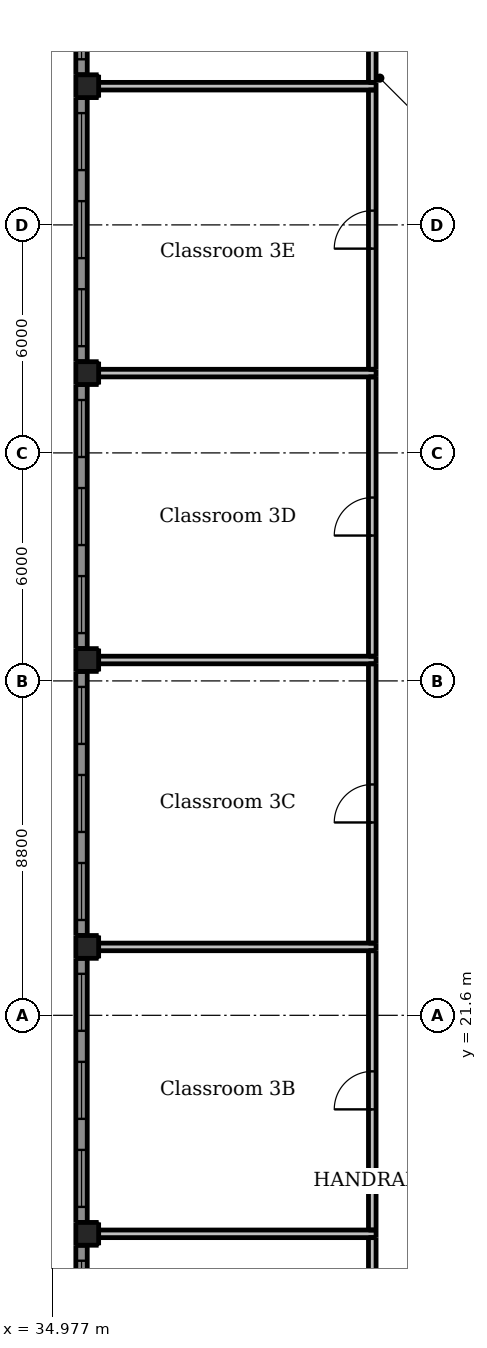
"""IFC4 building model, lengths in metres.
Left out: names, types, materials, properties, quantities, classifications, styles, units other than length and angle.
Written with IfcOpenShell. Run it as: python <this file> out.ifc"""

import sys

from ifc_helpers import new_model, si_unit, direction, frame, frame_2d, origin, origin_2d, place, context, subcontext, project, spatial, rectangle, extrude, element, fill, save


model = new_model("IFC4")
c1 = context("Model", 3, precision=1e-05, world=origin(), true_north=direction((0.0, 1.0)))
c2 = subcontext(c1, "Body", "Model", "MODEL_VIEW")
j1 = project(units=[si_unit("LENGTHUNIT", "METRE"), si_unit("PLANEANGLEUNIT", "RADIAN")], contexts=[c1])
p1 = place(None, origin())
s1 = spatial("IfcSite", under=j1, at=p1, CompositionType="ELEMENT")
p2 = place(p1, origin())
s2 = spatial("IfcBuilding", under=s1, at=p2, CompositionType="ELEMENT")
p3 = place(p2, frame((0.0, 0.0, 14.5)))
s3 = spatial("IfcBuildingStorey", under=s2, at=p3, CompositionType="ELEMENT", Elevation=14.5)
for number, where, z_axis, x_axis in (
    (1, (35.9, 15.85, -0.3), (0.0, 0.0, 1.0), (1.0, 0.0, 0.0)),
    (2, (35.9, 23.4, -0.3), (0.0, 0.0, 1.0), (1.0, 0.0, 0.0)),
    (3, (35.9, 30.95, -0.3), (0.0, 0.0, 1.0), (1.0, 0.0, 0.0)),
    (4, (35.9, 38.5, -0.3), (0.0, 0.0, 1.0), (1.0, 0.0, 0.0)),
    (5, (35.9, 46.05, -0.3), (0.0, 0.0, 1.0), (1.0, 0.0, 0.0)),
):
    element("IfcColumn", number, at=place(p3, frame(where, z_axis=z_axis, x_axis=x_axis)), inside=s3, PredefinedType="COLUMN", context=c2, shape_type="SweptSolid", body=[
        extrude(rectangle(XDim=0.6, YDim=0.6, at=origin_2d()), origin(), (0.0, 0.0, 1.0), 4.5),
    ])
p4 = place(p3, frame((35.75, 8.6, 0.0), z_axis=(0.0, 0.0, 1.0), x_axis=(0.0, 1.0, 0.0)))
e6 = element("IfcWall", 6, at=p4, inside=s3, PredefinedType="SOLIDWALL", context=c2, shape_type="SweptSolid", body=[
    extrude(rectangle(XDim=6.95, YDim=0.3, at=frame_2d((3.475, 0.0))), origin(), (0.0, 0.0, 1.0), 3.3),
])
p5 = place(p4, frame((0.408, 0.0, 0.9)))
e7 = element("IfcOpeningElement", 7, at=p5, cuts=e6, PredefinedType="OPENING", context=c2, shape_type="SweptSolid", body=[
    extrude(rectangle(XDim=1.5, YDim=1.5, at=frame_2d((0.75, 0.75))), frame((0.0, 0.16, 0.0), z_axis=(0.0, -1.0, 0.0), x_axis=(1.0, 0.0, 0.0)), (0.0, 0.0, 1.0), 0.32),
])
p6 = place(p4, frame((2.725, 0.0, 0.9)))
e8 = element("IfcOpeningElement", 8, at=p6, cuts=e6, PredefinedType="OPENING", context=c2, shape_type="SweptSolid", body=[
    extrude(rectangle(XDim=1.5, YDim=1.5, at=frame_2d((0.75, 0.75))), frame((0.0, 0.16, 0.0), z_axis=(0.0, -1.0, 0.0), x_axis=(1.0, 0.0, 0.0)), (0.0, 0.0, 1.0), 0.32),
])
p7 = place(p4, frame((5.042, 0.0, 0.9)))
e9 = element("IfcOpeningElement", 9, at=p7, cuts=e6, PredefinedType="OPENING", context=c2, shape_type="SweptSolid", body=[
    extrude(rectangle(XDim=1.5, YDim=1.5, at=frame_2d((0.75, 0.75))), frame((0.0, 0.16, 0.0), z_axis=(0.0, -1.0, 0.0), x_axis=(1.0, 0.0, 0.0)), (0.0, 0.0, 1.0), 0.32),
])
p8 = place(p3, frame((35.75, 16.15, 0.0), z_axis=(0.0, 0.0, 1.0), x_axis=(0.0, 1.0, 0.0)))
e10 = element("IfcWall", 10, at=p8, inside=s3, PredefinedType="SOLIDWALL", context=c2, shape_type="SweptSolid", body=[
    extrude(rectangle(XDim=6.95, YDim=0.3, at=frame_2d((3.475, 0.0))), origin(), (0.0, 0.0, 1.0), 3.3),
])
p9 = place(p8, frame((0.408, 0.0, 0.9)))
e11 = element("IfcOpeningElement", 11, at=p9, cuts=e10, PredefinedType="OPENING", context=c2, shape_type="SweptSolid", body=[
    extrude(rectangle(XDim=1.5, YDim=1.5, at=frame_2d((0.75, 0.75))), frame((0.0, 0.16, 0.0), z_axis=(0.0, -1.0, 0.0), x_axis=(1.0, 0.0, 0.0)), (0.0, 0.0, 1.0), 0.32),
])
p10 = place(p8, frame((2.725, 0.0, 0.9)))
e12 = element("IfcOpeningElement", 12, at=p10, cuts=e10, PredefinedType="OPENING", context=c2, shape_type="SweptSolid", body=[
    extrude(rectangle(XDim=1.5, YDim=1.5, at=frame_2d((0.75, 0.75))), frame((0.0, 0.16, 0.0), z_axis=(0.0, -1.0, 0.0), x_axis=(1.0, 0.0, 0.0)), (0.0, 0.0, 1.0), 0.32),
])
p11 = place(p8, frame((5.042, 0.0, 0.9)))
e13 = element("IfcOpeningElement", 13, at=p11, cuts=e10, PredefinedType="OPENING", context=c2, shape_type="SweptSolid", body=[
    extrude(rectangle(XDim=1.5, YDim=1.5, at=frame_2d((0.75, 0.75))), frame((0.0, 0.16, 0.0), z_axis=(0.0, -1.0, 0.0), x_axis=(1.0, 0.0, 0.0)), (0.0, 0.0, 1.0), 0.32),
])
p12 = place(p3, frame((35.75, 23.7, 0.0), z_axis=(0.0, 0.0, 1.0), x_axis=(0.0, 1.0, 0.0)))
e14 = element("IfcWall", 14, at=p12, inside=s3, PredefinedType="SOLIDWALL", context=c2, shape_type="SweptSolid", body=[
    extrude(rectangle(XDim=6.95, YDim=0.3, at=frame_2d((3.475, 0.0))), origin(), (0.0, 0.0, 1.0), 3.3),
])
p13 = place(p12, frame((0.408, 0.0, 0.9)))
e15 = element("IfcOpeningElement", 15, at=p13, cuts=e14, PredefinedType="OPENING", context=c2, shape_type="SweptSolid", body=[
    extrude(rectangle(XDim=1.5, YDim=1.5, at=frame_2d((0.75, 0.75))), frame((0.0, 0.16, 0.0), z_axis=(0.0, -1.0, 0.0), x_axis=(1.0, 0.0, 0.0)), (0.0, 0.0, 1.0), 0.32),
])
p14 = place(p12, frame((2.725, 0.0, 0.9)))
e16 = element("IfcOpeningElement", 16, at=p14, cuts=e14, PredefinedType="OPENING", context=c2, shape_type="SweptSolid", body=[
    extrude(rectangle(XDim=1.5, YDim=1.5, at=frame_2d((0.75, 0.75))), frame((0.0, 0.16, 0.0), z_axis=(0.0, -1.0, 0.0), x_axis=(1.0, 0.0, 0.0)), (0.0, 0.0, 1.0), 0.32),
])
p15 = place(p12, frame((5.042, 0.0, 0.9)))
e17 = element("IfcOpeningElement", 17, at=p15, cuts=e14, PredefinedType="OPENING", context=c2, shape_type="SweptSolid", body=[
    extrude(rectangle(XDim=1.5, YDim=1.5, at=frame_2d((0.75, 0.75))), frame((0.0, 0.16, 0.0), z_axis=(0.0, -1.0, 0.0), x_axis=(1.0, 0.0, 0.0)), (0.0, 0.0, 1.0), 0.32),
])
p16 = place(p3, frame((35.75, 31.25, 0.0), z_axis=(0.0, 0.0, 1.0), x_axis=(0.0, 1.0, 0.0)))
e18 = element("IfcWall", 18, at=p16, inside=s3, PredefinedType="SOLIDWALL", context=c2, shape_type="SweptSolid", body=[
    extrude(rectangle(XDim=6.95, YDim=0.3, at=frame_2d((3.475, 0.0))), origin(), (0.0, 0.0, 1.0), 3.3),
])
p17 = place(p16, frame((0.408, 0.0, 0.9)))
e19 = element("IfcOpeningElement", 19, at=p17, cuts=e18, PredefinedType="OPENING", context=c2, shape_type="SweptSolid", body=[
    extrude(rectangle(XDim=1.5, YDim=1.5, at=frame_2d((0.75, 0.75))), frame((0.0, 0.16, 0.0), z_axis=(0.0, -1.0, 0.0), x_axis=(1.0, 0.0, 0.0)), (0.0, 0.0, 1.0), 0.32),
])
p18 = place(p16, frame((2.725, 0.0, 0.9)))
e20 = element("IfcOpeningElement", 20, at=p18, cuts=e18, PredefinedType="OPENING", context=c2, shape_type="SweptSolid", body=[
    extrude(rectangle(XDim=1.5, YDim=1.5, at=frame_2d((0.75, 0.75))), frame((0.0, 0.16, 0.0), z_axis=(0.0, -1.0, 0.0), x_axis=(1.0, 0.0, 0.0)), (0.0, 0.0, 1.0), 0.32),
])
p19 = place(p16, frame((5.042, 0.0, 0.9)))
e21 = element("IfcOpeningElement", 21, at=p19, cuts=e18, PredefinedType="OPENING", context=c2, shape_type="SweptSolid", body=[
    extrude(rectangle(XDim=1.5, YDim=1.5, at=frame_2d((0.75, 0.75))), frame((0.0, 0.16, 0.0), z_axis=(0.0, -1.0, 0.0), x_axis=(1.0, 0.0, 0.0)), (0.0, 0.0, 1.0), 0.32),
])
p20 = place(p3, frame((35.75, 38.8, 0.0), z_axis=(0.0, 0.0, 1.0), x_axis=(0.0, 1.0, 0.0)))
e22 = element("IfcWall", 22, at=p20, inside=s3, PredefinedType="SOLIDWALL", context=c2, shape_type="SweptSolid", body=[
    extrude(rectangle(XDim=6.95, YDim=0.3, at=frame_2d((3.475, 0.0))), origin(), (0.0, 0.0, 1.0), 3.3),
])
p21 = place(p20, frame((0.408, 0.0, 0.9)))
e23 = element("IfcOpeningElement", 23, at=p21, cuts=e22, PredefinedType="OPENING", context=c2, shape_type="SweptSolid", body=[
    extrude(rectangle(XDim=1.5, YDim=1.5, at=frame_2d((0.75, 0.75))), frame((0.0, 0.16, 0.0), z_axis=(0.0, -1.0, 0.0), x_axis=(1.0, 0.0, 0.0)), (0.0, 0.0, 1.0), 0.32),
])
p22 = place(p20, frame((2.725, 0.0, 0.9)))
e24 = element("IfcOpeningElement", 24, at=p22, cuts=e22, PredefinedType="OPENING", context=c2, shape_type="SweptSolid", body=[
    extrude(rectangle(XDim=1.5, YDim=1.5, at=frame_2d((0.75, 0.75))), frame((0.0, 0.16, 0.0), z_axis=(0.0, -1.0, 0.0), x_axis=(1.0, 0.0, 0.0)), (0.0, 0.0, 1.0), 0.32),
])
p23 = place(p20, frame((5.042, 0.0, 0.9)))
e25 = element("IfcOpeningElement", 25, at=p23, cuts=e22, PredefinedType="OPENING", context=c2, shape_type="SweptSolid", body=[
    extrude(rectangle(XDim=1.5, YDim=1.5, at=frame_2d((0.75, 0.75))), frame((0.0, 0.16, 0.0), z_axis=(0.0, -1.0, 0.0), x_axis=(1.0, 0.0, 0.0)), (0.0, 0.0, 1.0), 0.32),
])
p24 = place(p3, frame((35.75, 46.35, 0.0), z_axis=(0.0, 0.0, 1.0), x_axis=(0.0, 1.0, 0.0)))
e26 = element("IfcWall", 26, at=p24, inside=s3, PredefinedType="SOLIDWALL", context=c2, shape_type="SweptSolid", body=[
    extrude(rectangle(XDim=6.95, YDim=0.3, at=frame_2d((3.475, 0.0))), origin(), (0.0, 0.0, 1.0), 3.3),
])
p25 = place(p24, frame((0.408, 0.0, 0.9)))
e27 = element("IfcOpeningElement", 27, at=p25, cuts=e26, PredefinedType="OPENING", context=c2, shape_type="SweptSolid", body=[
    extrude(rectangle(XDim=1.5, YDim=1.5, at=frame_2d((0.75, 0.75))), frame((0.0, 0.16, 0.0), z_axis=(0.0, -1.0, 0.0), x_axis=(1.0, 0.0, 0.0)), (0.0, 0.0, 1.0), 0.32),
])
p26 = place(p24, frame((2.725, 0.0, 0.9)))
e28 = element("IfcOpeningElement", 28, at=p26, cuts=e26, PredefinedType="OPENING", context=c2, shape_type="SweptSolid", body=[
    extrude(rectangle(XDim=1.5, YDim=1.5, at=frame_2d((0.75, 0.75))), frame((0.0, 0.16, 0.0), z_axis=(0.0, -1.0, 0.0), x_axis=(1.0, 0.0, 0.0)), (0.0, 0.0, 1.0), 0.32),
])
p27 = place(p24, frame((5.042, 0.0, 0.9)))
e29 = element("IfcOpeningElement", 29, at=p27, cuts=e26, PredefinedType="OPENING", context=c2, shape_type="SweptSolid", body=[
    extrude(rectangle(XDim=1.5, YDim=1.5, at=frame_2d((0.75, 0.75))), frame((0.0, 0.16, 0.0), z_axis=(0.0, -1.0, 0.0), x_axis=(1.0, 0.0, 0.0)), (0.0, 0.0, 1.0), 0.32),
])
p28 = place(p3, frame((43.4, 8.3, 0.0), z_axis=(0.0, 0.0, 1.0), x_axis=(0.0, 1.0, 0.0)))
e30 = element("IfcWall", 30, at=p28, inside=s3, PredefinedType="PARTITIONING", context=c2, shape_type="SweptSolid", body=[
    extrude(rectangle(XDim=7.45, YDim=0.2, at=frame_2d((3.725, 0.0))), origin(), (0.0, 0.0, 1.0), 3.1),
])
p29 = place(p28, frame((3.225, 0.0, 0.0)))
e31 = element("IfcOpeningElement", 31, at=p29, cuts=e30, PredefinedType="OPENING", context=c2, shape_type="SweptSolid", body=[
    extrude(rectangle(XDim=1.0, YDim=2.1, at=frame_2d((0.5, 1.05))), frame((0.0, 0.11, 0.0), z_axis=(0.0, -1.0, 0.0), x_axis=(1.0, 0.0, 0.0)), (0.0, 0.0, 1.0), 0.22),
])
p30 = place(p3, frame((43.4, 15.95, 0.0), z_axis=(0.0, 0.0, 1.0), x_axis=(0.0, 1.0, 0.0)))
e32 = element("IfcWall", 32, at=p30, inside=s3, PredefinedType="PARTITIONING", context=c2, shape_type="SweptSolid", body=[
    extrude(rectangle(XDim=7.35, YDim=0.2, at=frame_2d((3.675, 0.0))), origin(), (0.0, 0.0, 1.0), 3.1),
])
p31 = place(p30, frame((3.175, 0.0, 0.0)))
e33 = element("IfcOpeningElement", 33, at=p31, cuts=e32, PredefinedType="OPENING", context=c2, shape_type="SweptSolid", body=[
    extrude(rectangle(XDim=1.0, YDim=2.1, at=frame_2d((0.5, 1.05))), frame((0.0, 0.11, 0.0), z_axis=(0.0, -1.0, 0.0), x_axis=(1.0, 0.0, 0.0)), (0.0, 0.0, 1.0), 0.22),
])
p32 = place(p3, frame((43.4, 23.5, 0.0), z_axis=(0.0, 0.0, 1.0), x_axis=(0.0, 1.0, 0.0)))
e34 = element("IfcWall", 34, at=p32, inside=s3, PredefinedType="PARTITIONING", context=c2, shape_type="SweptSolid", body=[
    extrude(rectangle(XDim=7.35, YDim=0.2, at=frame_2d((3.675, 0.0))), origin(), (0.0, 0.0, 1.0), 3.1),
])
p33 = place(p32, frame((3.175, 0.0, 0.0)))
e35 = element("IfcOpeningElement", 35, at=p33, cuts=e34, PredefinedType="OPENING", context=c2, shape_type="SweptSolid", body=[
    extrude(rectangle(XDim=1.0, YDim=2.1, at=frame_2d((0.5, 1.05))), frame((0.0, 0.11, 0.0), z_axis=(0.0, -1.0, 0.0), x_axis=(1.0, 0.0, 0.0)), (0.0, 0.0, 1.0), 0.22),
])
p34 = place(p3, frame((43.4, 31.05, 0.0), z_axis=(0.0, 0.0, 1.0), x_axis=(0.0, 1.0, 0.0)))
e36 = element("IfcWall", 36, at=p34, inside=s3, PredefinedType="PARTITIONING", context=c2, shape_type="SweptSolid", body=[
    extrude(rectangle(XDim=7.35, YDim=0.2, at=frame_2d((3.675, 0.0))), origin(), (0.0, 0.0, 1.0), 3.1),
])
p35 = place(p34, frame((3.175, 0.0, 0.0)))
e37 = element("IfcOpeningElement", 37, at=p35, cuts=e36, PredefinedType="OPENING", context=c2, shape_type="SweptSolid", body=[
    extrude(rectangle(XDim=1.0, YDim=2.1, at=frame_2d((0.5, 1.05))), frame((0.0, 0.11, 0.0), z_axis=(0.0, -1.0, 0.0), x_axis=(1.0, 0.0, 0.0)), (0.0, 0.0, 1.0), 0.22),
])
p36 = place(p3, frame((43.4, 38.6, 0.0), z_axis=(0.0, 0.0, 1.0), x_axis=(0.0, 1.0, 0.0)))
e38 = element("IfcWall", 38, at=p36, inside=s3, PredefinedType="PARTITIONING", context=c2, shape_type="SweptSolid", body=[
    extrude(rectangle(XDim=7.35, YDim=0.2, at=frame_2d((3.675, 0.0))), origin(), (0.0, 0.0, 1.0), 3.1),
])
p37 = place(p36, frame((3.175, 0.0, 0.0)))
e39 = element("IfcOpeningElement", 39, at=p37, cuts=e38, PredefinedType="OPENING", context=c2, shape_type="SweptSolid", body=[
    extrude(rectangle(XDim=1.0, YDim=2.1, at=frame_2d((0.5, 1.05))), frame((0.0, 0.11, 0.0), z_axis=(0.0, -1.0, 0.0), x_axis=(1.0, 0.0, 0.0)), (0.0, 0.0, 1.0), 0.22),
])
p38 = place(p3, frame((43.4, 46.15, 0.0), z_axis=(0.0, 0.0, 1.0), x_axis=(0.0, 1.0, 0.0)))
e40 = element("IfcWall", 40, at=p38, inside=s3, PredefinedType="PARTITIONING", context=c2, shape_type="SweptSolid", body=[
    extrude(rectangle(XDim=7.35, YDim=0.2, at=frame_2d((3.675, 0.0))), origin(), (0.0, 0.0, 1.0), 3.1),
])
p39 = place(p38, frame((3.175, 0.0, 0.0)))
e41 = element("IfcOpeningElement", 41, at=p39, cuts=e40, PredefinedType="OPENING", context=c2, shape_type="SweptSolid", body=[
    extrude(rectangle(XDim=1.0, YDim=2.1, at=frame_2d((0.5, 1.05))), frame((0.0, 0.11, 0.0), z_axis=(0.0, -1.0, 0.0), x_axis=(1.0, 0.0, 0.0)), (0.0, 0.0, 1.0), 0.22),
])
for number, where, z_axis, x_axis in (
    (42, (36.2, 15.85, 0.0), (0.0, 0.0, 1.0), (1.0, 0.0, 0.0)),
    (43, (36.2, 23.4, 0.0), (0.0, 0.0, 1.0), (1.0, 0.0, 0.0)),
    (44, (36.2, 30.95, 0.0), (0.0, 0.0, 1.0), (1.0, 0.0, 0.0)),
    (45, (36.2, 38.5, 0.0), (0.0, 0.0, 1.0), (1.0, 0.0, 0.0)),
    (46, (36.2, 46.05, 0.0), (0.0, 0.0, 1.0), (1.0, 0.0, 0.0)),
):
    element("IfcWall", number, at=place(p3, frame(where, z_axis=z_axis, x_axis=x_axis)), inside=s3, PredefinedType="PARTITIONING", context=c2, shape_type="SweptSolid", body=[
        extrude(rectangle(XDim=7.3, YDim=0.2, at=frame_2d((3.65, 0.0))), origin(), (0.0, 0.0, 1.0), 3.1),
    ])
p40 = place(p7, origin())
e47 = element("IfcWindow", 47, at=p40, inside=s3, PartitioningType="DOUBLE_PANEL_HORIZONTAL", PredefinedType="WINDOW", context=c2, shape_type="SweptSolid", body=[
    extrude(rectangle(XDim=1.5, YDim=1.5, at=frame_2d((0.75, 0.75))), frame((0.0, 0.03, 0.0), z_axis=(0.0, -1.0, 0.0), x_axis=(1.0, 0.0, 0.0)), (0.0, 0.0, 1.0), 0.06),
])
fill(e9, e47)
p41 = place(p9, origin())
e48 = element("IfcWindow", 48, at=p41, inside=s3, PartitioningType="DOUBLE_PANEL_HORIZONTAL", PredefinedType="WINDOW", context=c2, shape_type="SweptSolid", body=[
    extrude(rectangle(XDim=1.5, YDim=1.5, at=frame_2d((0.75, 0.75))), frame((0.0, 0.03, 0.0), z_axis=(0.0, -1.0, 0.0), x_axis=(1.0, 0.0, 0.0)), (0.0, 0.0, 1.0), 0.06),
])
fill(e11, e48)
p42 = place(p10, origin())
e49 = element("IfcWindow", 49, at=p42, inside=s3, PartitioningType="DOUBLE_PANEL_HORIZONTAL", PredefinedType="WINDOW", context=c2, shape_type="SweptSolid", body=[
    extrude(rectangle(XDim=1.5, YDim=1.5, at=frame_2d((0.75, 0.75))), frame((0.0, 0.03, 0.0), z_axis=(0.0, -1.0, 0.0), x_axis=(1.0, 0.0, 0.0)), (0.0, 0.0, 1.0), 0.06),
])
fill(e12, e49)
p43 = place(p11, origin())
e50 = element("IfcWindow", 50, at=p43, inside=s3, PartitioningType="DOUBLE_PANEL_HORIZONTAL", PredefinedType="WINDOW", context=c2, shape_type="SweptSolid", body=[
    extrude(rectangle(XDim=1.5, YDim=1.5, at=frame_2d((0.75, 0.75))), frame((0.0, 0.03, 0.0), z_axis=(0.0, -1.0, 0.0), x_axis=(1.0, 0.0, 0.0)), (0.0, 0.0, 1.0), 0.06),
])
fill(e13, e50)
p44 = place(p13, origin())
e51 = element("IfcWindow", 51, at=p44, inside=s3, PartitioningType="DOUBLE_PANEL_HORIZONTAL", PredefinedType="WINDOW", context=c2, shape_type="SweptSolid", body=[
    extrude(rectangle(XDim=1.5, YDim=1.5, at=frame_2d((0.75, 0.75))), frame((0.0, 0.03, 0.0), z_axis=(0.0, -1.0, 0.0), x_axis=(1.0, 0.0, 0.0)), (0.0, 0.0, 1.0), 0.06),
])
fill(e15, e51)
p45 = place(p14, origin())
e52 = element("IfcWindow", 52, at=p45, inside=s3, PartitioningType="DOUBLE_PANEL_HORIZONTAL", PredefinedType="WINDOW", context=c2, shape_type="SweptSolid", body=[
    extrude(rectangle(XDim=1.5, YDim=1.5, at=frame_2d((0.75, 0.75))), frame((0.0, 0.03, 0.0), z_axis=(0.0, -1.0, 0.0), x_axis=(1.0, 0.0, 0.0)), (0.0, 0.0, 1.0), 0.06),
])
fill(e16, e52)
p46 = place(p15, origin())
e53 = element("IfcWindow", 53, at=p46, inside=s3, PartitioningType="DOUBLE_PANEL_HORIZONTAL", PredefinedType="WINDOW", context=c2, shape_type="SweptSolid", body=[
    extrude(rectangle(XDim=1.5, YDim=1.5, at=frame_2d((0.75, 0.75))), frame((0.0, 0.03, 0.0), z_axis=(0.0, -1.0, 0.0), x_axis=(1.0, 0.0, 0.0)), (0.0, 0.0, 1.0), 0.06),
])
fill(e17, e53)
p47 = place(p17, origin())
e54 = element("IfcWindow", 54, at=p47, inside=s3, PartitioningType="DOUBLE_PANEL_HORIZONTAL", PredefinedType="WINDOW", context=c2, shape_type="SweptSolid", body=[
    extrude(rectangle(XDim=1.5, YDim=1.5, at=frame_2d((0.75, 0.75))), frame((0.0, 0.03, 0.0), z_axis=(0.0, -1.0, 0.0), x_axis=(1.0, 0.0, 0.0)), (0.0, 0.0, 1.0), 0.06),
])
fill(e19, e54)
p48 = place(p18, origin())
e55 = element("IfcWindow", 55, at=p48, inside=s3, PartitioningType="DOUBLE_PANEL_HORIZONTAL", PredefinedType="WINDOW", context=c2, shape_type="SweptSolid", body=[
    extrude(rectangle(XDim=1.5, YDim=1.5, at=frame_2d((0.75, 0.75))), frame((0.0, 0.03, 0.0), z_axis=(0.0, -1.0, 0.0), x_axis=(1.0, 0.0, 0.0)), (0.0, 0.0, 1.0), 0.06),
])
fill(e20, e55)
p49 = place(p19, origin())
e56 = element("IfcWindow", 56, at=p49, inside=s3, PartitioningType="DOUBLE_PANEL_HORIZONTAL", PredefinedType="WINDOW", context=c2, shape_type="SweptSolid", body=[
    extrude(rectangle(XDim=1.5, YDim=1.5, at=frame_2d((0.75, 0.75))), frame((0.0, 0.03, 0.0), z_axis=(0.0, -1.0, 0.0), x_axis=(1.0, 0.0, 0.0)), (0.0, 0.0, 1.0), 0.06),
])
fill(e21, e56)
p50 = place(p21, origin())
e57 = element("IfcWindow", 57, at=p50, inside=s3, PartitioningType="DOUBLE_PANEL_HORIZONTAL", PredefinedType="WINDOW", context=c2, shape_type="SweptSolid", body=[
    extrude(rectangle(XDim=1.5, YDim=1.5, at=frame_2d((0.75, 0.75))), frame((0.0, 0.03, 0.0), z_axis=(0.0, -1.0, 0.0), x_axis=(1.0, 0.0, 0.0)), (0.0, 0.0, 1.0), 0.06),
])
fill(e23, e57)
p51 = place(p22, origin())
e58 = element("IfcWindow", 58, at=p51, inside=s3, PartitioningType="DOUBLE_PANEL_HORIZONTAL", PredefinedType="WINDOW", context=c2, shape_type="SweptSolid", body=[
    extrude(rectangle(XDim=1.5, YDim=1.5, at=frame_2d((0.75, 0.75))), frame((0.0, 0.03, 0.0), z_axis=(0.0, -1.0, 0.0), x_axis=(1.0, 0.0, 0.0)), (0.0, 0.0, 1.0), 0.06),
])
fill(e24, e58)
p52 = place(p23, origin())
e59 = element("IfcWindow", 59, at=p52, inside=s3, PartitioningType="DOUBLE_PANEL_HORIZONTAL", PredefinedType="WINDOW", context=c2, shape_type="SweptSolid", body=[
    extrude(rectangle(XDim=1.5, YDim=1.5, at=frame_2d((0.75, 0.75))), frame((0.0, 0.03, 0.0), z_axis=(0.0, -1.0, 0.0), x_axis=(1.0, 0.0, 0.0)), (0.0, 0.0, 1.0), 0.06),
])
fill(e25, e59)
p53 = place(p25, origin())
e60 = element("IfcWindow", 60, at=p53, inside=s3, PartitioningType="DOUBLE_PANEL_HORIZONTAL", PredefinedType="WINDOW", context=c2, shape_type="SweptSolid", body=[
    extrude(rectangle(XDim=1.5, YDim=1.5, at=frame_2d((0.75, 0.75))), frame((0.0, 0.03, 0.0), z_axis=(0.0, -1.0, 0.0), x_axis=(1.0, 0.0, 0.0)), (0.0, 0.0, 1.0), 0.06),
])
fill(e27, e60)
p54 = place(p31, origin())
e61 = element("IfcDoor", 61, at=p54, inside=s3, OperationType="SINGLE_SWING_LEFT", PredefinedType="DOOR", context=c2, shape_type="SweptSolid", body=[
    extrude(rectangle(XDim=1.0, YDim=2.1, at=frame_2d((0.5, 1.05))), frame((0.0, 0.025, 0.0), z_axis=(0.0, -1.0, 0.0), x_axis=(1.0, 0.0, 0.0)), (0.0, 0.0, 1.0), 0.05),
])
fill(e33, e61)
p55 = place(p33, origin())
e62 = element("IfcDoor", 62, at=p55, inside=s3, OperationType="SINGLE_SWING_LEFT", PredefinedType="DOOR", context=c2, shape_type="SweptSolid", body=[
    extrude(rectangle(XDim=1.0, YDim=2.1, at=frame_2d((0.5, 1.05))), frame((0.0, 0.025, 0.0), z_axis=(0.0, -1.0, 0.0), x_axis=(1.0, 0.0, 0.0)), (0.0, 0.0, 1.0), 0.05),
])
fill(e35, e62)
p56 = place(p35, origin())
e63 = element("IfcDoor", 63, at=p56, inside=s3, OperationType="SINGLE_SWING_LEFT", PredefinedType="DOOR", context=c2, shape_type="SweptSolid", body=[
    extrude(rectangle(XDim=1.0, YDim=2.1, at=frame_2d((0.5, 1.05))), frame((0.0, 0.025, 0.0), z_axis=(0.0, -1.0, 0.0), x_axis=(1.0, 0.0, 0.0)), (0.0, 0.0, 1.0), 0.05),
])
fill(e37, e63)
p57 = place(p37, origin())
e64 = element("IfcDoor", 64, at=p57, inside=s3, OperationType="SINGLE_SWING_LEFT", PredefinedType="DOOR", context=c2, shape_type="SweptSolid", body=[
    extrude(rectangle(XDim=1.0, YDim=2.1, at=frame_2d((0.5, 1.05))), frame((0.0, 0.025, 0.0), z_axis=(0.0, -1.0, 0.0), x_axis=(1.0, 0.0, 0.0)), (0.0, 0.0, 1.0), 0.05),
])
fill(e39, e64)
save(model, sys.argv[1])
